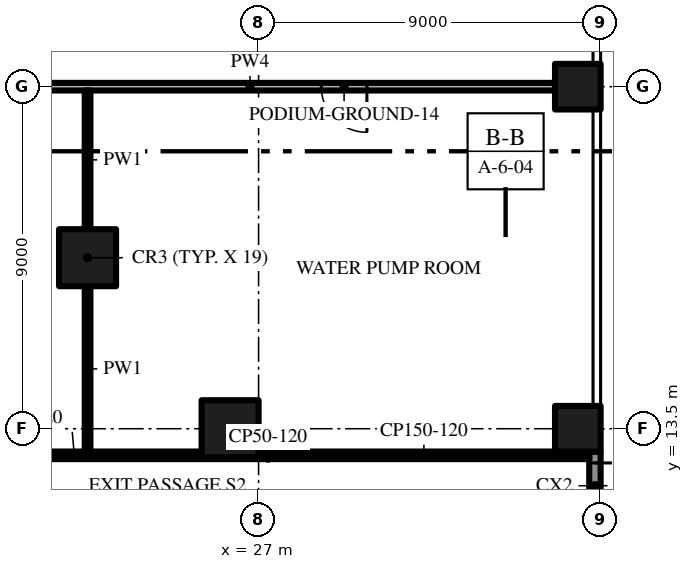
"""IFC4 building model, lengths in metres.
Left out: names, types, materials, properties, quantities, classifications, styles, units other than length and angle.
Written with IfcOpenShell. Run it as: python <this file> out.ifc"""

import sys

from ifc_helpers import new_model, si_unit, direction, frame, frame_2d, origin, origin_2d, place, context, subcontext, project, spatial, rectangle, extrude, element, fill, save


model = new_model("IFC4")
c1 = context("Model", 3, precision=1e-05, world=origin(), true_north=direction((0.0, 1.0)))
c2 = subcontext(c1, "Body", "Model", "MODEL_VIEW")
j1 = project(units=[si_unit("LENGTHUNIT", "METRE"), si_unit("PLANEANGLEUNIT", "RADIAN")], contexts=[c1])
p1 = place(None, origin())
s1 = spatial("IfcSite", under=j1, at=p1, CompositionType="ELEMENT")
p2 = place(p1, origin())
s2 = spatial("IfcBuilding", under=s1, at=p2, CompositionType="ELEMENT")
p3 = place(p2, origin())
s3 = spatial("IfcBuildingStorey", under=s2, at=p3, CompositionType="ELEMENT", Elevation=0.0)
for number, where, z_axis, x_axis in (
    (1, (35.4, 13.5, 0.0), (0.0, 0.0, 1.0), (1.0, 0.0, 0.0)),
    (2, (35.4, 22.5, 0.0), (0.0, 0.0, 1.0), (1.0, 0.0, 0.0)),
):
    element("IfcColumn", number, at=place(p3, frame(where, z_axis=z_axis, x_axis=x_axis)), inside=s3, PredefinedType="COLUMN", context=c2, shape_type="SweptSolid", body=[
        extrude(rectangle(XDim=1.2, YDim=1.2, at=origin_2d()), origin(), (0.0, 0.0, 1.0), 5.6),
    ])
for number, where, z_axis, x_axis in (
    (3, (26.25, 13.5, 0.0), (0.0, 0.0, 1.0), (1.0, 0.0, 0.0)),
    (4, (22.5, 18.0, 0.0), (0.0, 0.0, 1.0), (1.0, 0.0, 0.0)),
):
    element("IfcColumn", number, at=place(p3, frame(where, z_axis=z_axis, x_axis=x_axis)), inside=s3, PredefinedType="COLUMN", context=c2, shape_type="SweptSolid", body=[
        extrude(rectangle(XDim=1.5, YDim=1.5, at=origin_2d()), origin(), (0.0, 0.0, 1.0), 5.6),
    ])
p4 = place(p3, frame((18.8, 12.725, 0.0), z_axis=(0.0, 0.0, 1.0), x_axis=(1.0, 0.0, 0.0)))
e5 = element("IfcWall", 5, at=p4, inside=s3, PredefinedType="PARTITIONING", context=c2, shape_type="SweptSolid", body=[
    extrude(rectangle(XDim=16.9, YDim=0.05, at=frame_2d((8.45, 0.0))), origin(), (0.0, 0.0, 1.0), 5.6),
])
p5 = place(p3, frame((18.8, 12.825, 0.0), z_axis=(0.0, 0.0, 1.0), x_axis=(1.0, 0.0, 0.0)))
e6 = element("IfcWall", 6, at=p5, inside=s3, PredefinedType="PARTITIONING", context=c2, shape_type="SweptSolid", body=[
    extrude(rectangle(XDim=6.7, YDim=0.15, at=frame_2d((3.35, 0.0))), origin(), (0.0, 0.0, 1.0), 5.6),
])
p6 = place(p3, frame((27.0, 12.825, 0.0), z_axis=(0.0, 0.0, 1.0), x_axis=(1.0, 0.0, 0.0)))
e7 = element("IfcWall", 7, at=p6, inside=s3, PredefinedType="PARTITIONING", context=c2, shape_type="SweptSolid", body=[
    extrude(rectangle(XDim=8.7, YDim=0.15, at=frame_2d((4.35, 0.0))), origin(), (0.0, 0.0, 1.0), 5.6),
])
p7 = place(p3, frame((35.85, 12.9, 0.0), z_axis=(0.0, 0.0, 1.0), x_axis=(0.0, -1.0, 0.0)))
e8 = element("IfcWall", 8, at=p7, inside=s3, PredefinedType="PARTITIONING", context=c2, shape_type="SweptSolid", body=[
    extrude(rectangle(XDim=1.8, YDim=0.3, at=frame_2d((0.9, 0.0))), origin(), (0.0, 0.0, 1.0), 5.6),
])
p8 = place(p7, frame((0.3, 0.0, 0.0)))
e9 = element("IfcOpeningElement", 9, at=p8, cuts=e8, PredefinedType="OPENING", context=c2, shape_type="SweptSolid", body=[
    extrude(rectangle(XDim=1.2, YDim=2.2, at=frame_2d((0.6, 1.1))), frame((0.0, 0.16, 0.0), z_axis=(0.0, -1.0, 0.0), x_axis=(1.0, 0.0, 0.0)), (0.0, 0.0, 1.0), 0.32),
])
p9 = place(p3, frame((34.8, 22.5, 0.0), z_axis=(0.0, 0.0, 1.0), x_axis=(-1.0, 0.0, 0.0)))
e10 = element("IfcWall", 10, at=p9, inside=s3, PredefinedType="PARTITIONING", context=c2, shape_type="SweptSolid", body=[
    extrude(rectangle(XDim=16.05, YDim=0.2, at=frame_2d((8.025, 0.0))), origin(), (0.0, 0.0, 1.0), 5.6),
])
p10 = place(p9, frame((4.95, 0.0, 0.0)))
e11 = element("IfcOpeningElement", 11, at=p10, cuts=e10, PredefinedType="OPENING", context=c2, shape_type="SweptSolid", body=[
    extrude(rectangle(XDim=1.2, YDim=2.4, at=frame_2d((0.6, 1.2))), frame((0.0, 0.11, 0.0), z_axis=(0.0, -1.0, 0.0), x_axis=(1.0, 0.0, 0.0)), (0.0, 0.0, 1.0), 0.22),
])
p11 = place(p3, frame((22.5, 12.9, 0.0), z_axis=(0.0, 0.0, 1.0), x_axis=(0.0, 1.0, 0.0)))
e12 = element("IfcWall", 12, at=p11, inside=s3, PredefinedType="PARTITIONING", context=c2, shape_type="SweptSolid", body=[
    extrude(rectangle(XDim=4.35, YDim=0.15, at=frame_2d((2.175, 0.0))), origin(), (0.0, 0.0, 1.0), 5.6),
])
p12 = place(p3, frame((22.5, 18.75, 0.0), z_axis=(0.0, 0.0, 1.0), x_axis=(0.0, 1.0, 0.0)))
e13 = element("IfcWall", 13, at=p12, inside=s3, PredefinedType="PARTITIONING", context=c2, shape_type="SweptSolid", body=[
    extrude(rectangle(XDim=3.65, YDim=0.15, at=frame_2d((1.825, 0.0))), origin(), (0.0, 0.0, 1.0), 5.6),
])
p13 = place(p8, origin())
e14 = element("IfcDoor", 14, at=p13, inside=s3, OperationType="SINGLE_SWING_LEFT", PredefinedType="DOOR", context=c2, shape_type="SweptSolid", body=[
    extrude(rectangle(XDim=1.2, YDim=2.2, at=frame_2d((0.6, 1.1))), frame((0.0, 0.025, 0.0), z_axis=(0.0, -1.0, 0.0), x_axis=(1.0, 0.0, 0.0)), (0.0, 0.0, 1.0), 0.05),
])
fill(e9, e14)
p14 = place(p10, origin())
e15 = element("IfcDoor", 15, at=p14, inside=s3, OperationType="SINGLE_SWING_LEFT", PredefinedType="DOOR", context=c2, shape_type="SweptSolid", body=[
    extrude(rectangle(XDim=1.2, YDim=2.4, at=frame_2d((0.6, 1.2))), frame((0.0, 0.025, 0.0), z_axis=(0.0, -1.0, 0.0), x_axis=(1.0, 0.0, 0.0)), (0.0, 0.0, 1.0), 0.05),
])
fill(e11, e15)
save(model, sys.argv[1])
